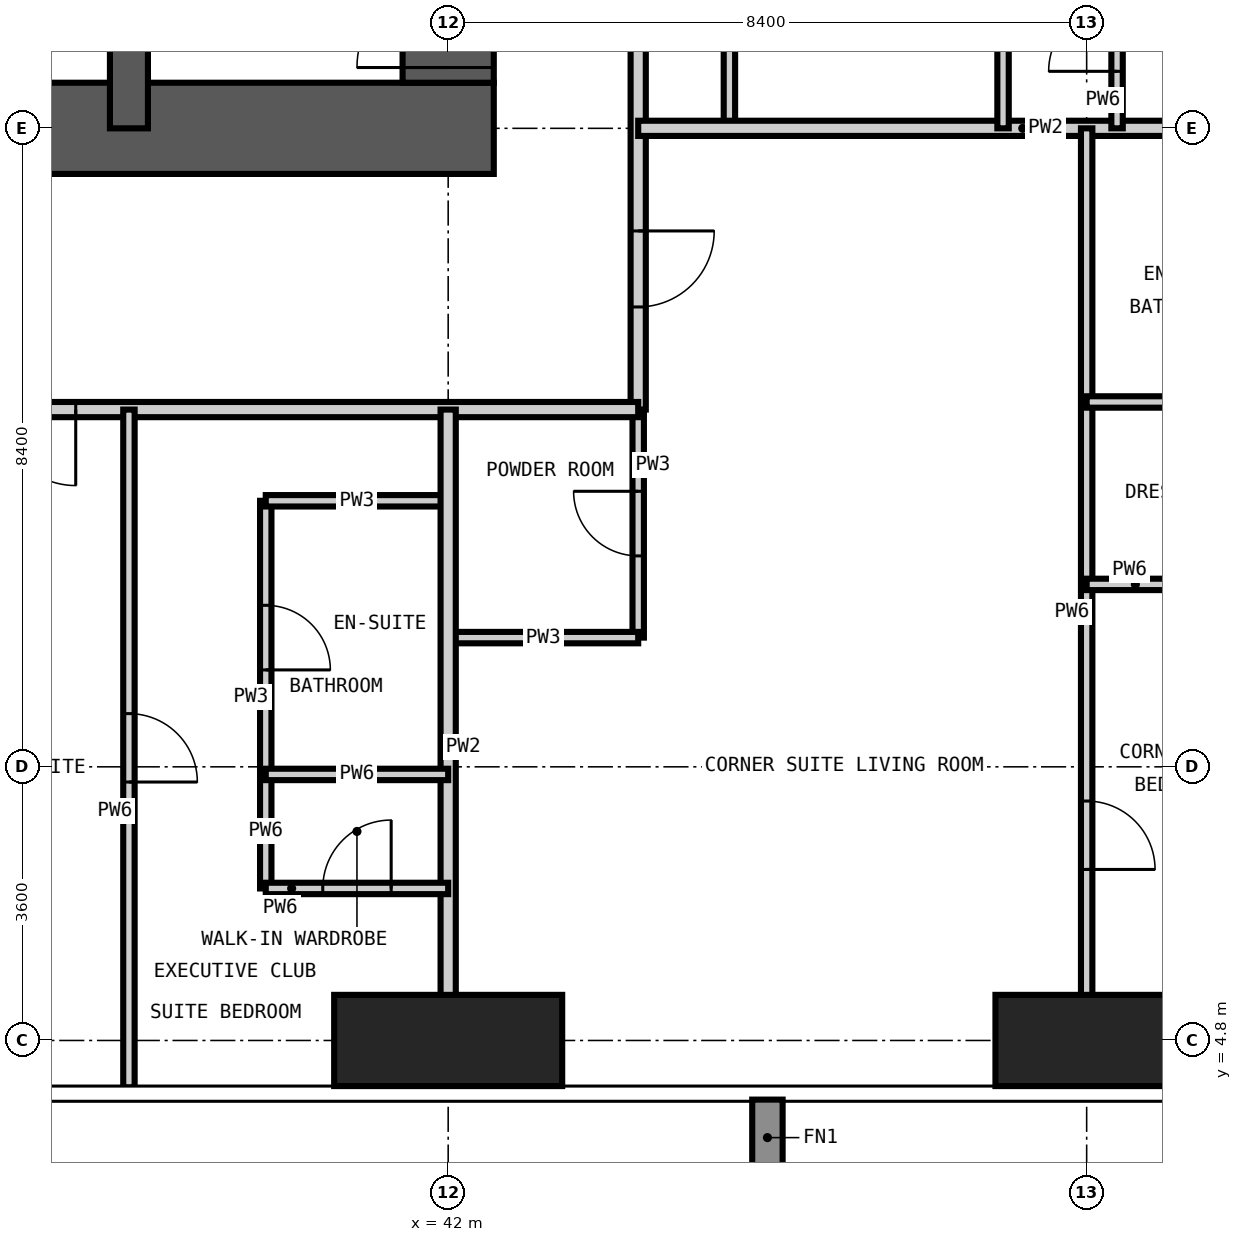
"""IFC4 building model, lengths in metres.
Left out: names, types, materials, properties, quantities, classifications, styles, units other than length and angle.
Written with IfcOpenShell. Run it as: python <this file> out.ifc"""

import sys

from ifc_helpers import new_model, si_unit, direction, frame, frame_2d, origin, origin_2d, place, context, subcontext, project, spatial, rectangle, extrude, element, fill, save


model = new_model("IFC4")
c1 = context("Model", 3, precision=1e-05, world=origin(), true_north=direction((0.0, 1.0)))
c2 = subcontext(c1, "Body", "Model", "MODEL_VIEW")
j1 = project(units=[si_unit("LENGTHUNIT", "METRE"), si_unit("PLANEANGLEUNIT", "RADIAN")], contexts=[c1])
p1 = place(None, origin())
s1 = spatial("IfcSite", under=j1, at=p1, CompositionType="ELEMENT")
p2 = place(p1, origin())
s2 = spatial("IfcBuilding", under=s1, at=p2, CompositionType="ELEMENT")
p3 = place(p2, frame((0.0, 0.0, 216.6)))
s3 = spatial("IfcBuildingStorey", under=s2, at=p3, CompositionType="ELEMENT", Elevation=216.6)
p4 = place(p3, frame((42.0, 4.8, -0.35), z_axis=(0.0, 0.0, 1.0), x_axis=(1.0, 0.0, 0.0)))
e1 = element("IfcColumn", 1, at=p4, inside=s3, PredefinedType="COLUMN", context=c2, shape_type="SweptSolid", body=[
    extrude(rectangle(XDim=3.0, YDim=1.2, at=origin_2d()), origin(), (0.0, 0.0, 1.0), 3.55),
])
p5 = place(p3, frame((50.4, 4.8, -0.35), z_axis=(0.0, 0.0, 1.0), x_axis=(1.0, 0.0, 0.0)))
e2 = element("IfcColumn", 2, at=p5, inside=s3, PredefinedType="COLUMN", context=c2, shape_type="SweptSolid", body=[
    extrude(rectangle(XDim=2.4, YDim=1.2, at=origin_2d()), origin(), (0.0, 0.0, 1.0), 3.55),
])
p6 = place(p3, frame((16.2, 16.8, -0.35), z_axis=(0.0, 0.0, 1.0), x_axis=(1.0, 0.0, 0.0)))
e3 = element("IfcWall", 3, at=p6, inside=s3, PredefinedType="SHEAR", context=c2, shape_type="SweptSolid", body=[
    extrude(rectangle(XDim=26.4, YDim=1.2, at=frame_2d((13.2, 0.0))), origin(), (0.0, 0.0, 1.0), 3.55),
])
p7 = place(p6, frame((12.7, 0.0, 0.35)))
e4 = element("IfcOpeningElement", 4, at=p7, cuts=e3, PredefinedType="OPENING", context=c2, shape_type="SweptSolid", body=[
    extrude(rectangle(XDim=1.0, YDim=2.1, at=frame_2d((0.5, 1.05))), frame((0.0, 0.61, 0.0), z_axis=(0.0, -1.0, 0.0), x_axis=(1.0, 0.0, 0.0)), (0.0, 0.0, 1.0), 1.22),
])
p8 = place(p6, frame((19.0, 0.0, 0.35)))
e5 = element("IfcOpeningElement", 5, at=p8, cuts=e3, PredefinedType="OPENING", context=c2, shape_type="SweptSolid", body=[
    extrude(rectangle(XDim=1.0, YDim=2.1, at=frame_2d((0.5, 1.05))), frame((0.0, 0.61, 0.0), z_axis=(0.0, -1.0, 0.0), x_axis=(1.0, 0.0, 0.0)), (0.0, 0.0, 1.0), 1.22),
])
p9 = place(p3, frame((42.0, 17.4, -0.35), z_axis=(0.0, 0.0, 1.0), x_axis=(0.0, 1.0, 0.0)))
e6 = element("IfcWall", 6, at=p9, inside=s3, PredefinedType="SHEAR", context=c2, shape_type="SweptSolid", body=[
    extrude(rectangle(XDim=24.0, YDim=1.2, at=frame_2d((12.0, 0.0))), origin(), (0.0, 0.0, 1.0), 3.55),
])
p10 = place(p9, frame((0.2, 0.0, 0.35)))
e7 = element("IfcOpeningElement", 7, at=p10, cuts=e6, PredefinedType="OPENING", context=c2, shape_type="SweptSolid", body=[
    extrude(rectangle(XDim=1.2, YDim=2.2, at=frame_2d((0.6, 1.1))), frame((0.0, 0.61, 0.0), z_axis=(0.0, -1.0, 0.0), x_axis=(1.0, 0.0, 0.0)), (0.0, 0.0, 1.0), 1.22),
])
p11 = place(p9, frame((11.5, 0.0, 0.35)))
e8 = element("IfcOpeningElement", 8, at=p11, cuts=e6, PredefinedType="OPENING", context=c2, shape_type="SweptSolid", body=[
    extrude(rectangle(XDim=1.0, YDim=2.1, at=frame_2d((0.5, 1.05))), frame((0.0, 0.61, 0.0), z_axis=(0.0, -1.0, 0.0), x_axis=(1.0, 0.0, 0.0)), (0.0, 0.0, 1.0), 1.22),
])
p12 = place(p9, frame((19.9, 0.0, 0.35)))
e9 = element("IfcOpeningElement", 9, at=p12, cuts=e6, PredefinedType="OPENING", context=c2, shape_type="SweptSolid", body=[
    extrude(rectangle(XDim=1.0, YDim=2.1, at=frame_2d((0.5, 1.05))), frame((0.0, 0.61, 0.0), z_axis=(0.0, -1.0, 0.0), x_axis=(1.0, 0.0, 0.0)), (0.0, 0.0, 1.0), 1.22),
])
p13 = place(p3, frame((37.8, 16.8, -0.35), z_axis=(0.0, 0.0, 1.0), x_axis=(0.0, 1.0, 0.0)))
e10 = element("IfcWall", 10, at=p13, inside=s3, PredefinedType="SHEAR", context=c2, shape_type="SweptSolid", body=[
    extrude(rectangle(XDim=11.2, YDim=0.5, at=frame_2d((5.6, 0.0))), origin(), (0.0, 0.0, 1.0), 3.55),
])
p14 = place(p3, frame((39.6, 8.3, 0.0), z_axis=(0.0, 0.0, 1.0), x_axis=(0.0, 1.0, 0.0)))
e11 = element("IfcWall", 11, at=p14, inside=s3, PredefinedType="PARTITIONING", context=c2, shape_type="SweptSolid", body=[
    extrude(rectangle(XDim=3.6, YDim=0.15, at=frame_2d((1.8, 0.0))), origin(), (0.0, 0.0, 1.0), 3.2),
])
p15 = place(p14, frame((1.375, 0.0, 0.0)))
e12 = element("IfcOpeningElement", 12, at=p15, cuts=e11, PredefinedType="OPENING", context=c2, shape_type="SweptSolid", body=[
    extrude(rectangle(XDim=0.85, YDim=2.1, at=frame_2d((0.425, 1.05))), frame((0.0, 0.085, 0.0), z_axis=(0.0, -1.0, 0.0), x_axis=(1.0, 0.0, 0.0)), (0.0, 0.0, 1.0), 0.17),
])
p16 = place(p3, frame((44.5, 10.1, 0.0), z_axis=(0.0, 0.0, 1.0), x_axis=(0.0, 1.0, 0.0)))
e13 = element("IfcWall", 13, at=p16, inside=s3, PredefinedType="PARTITIONING", context=c2, shape_type="SweptSolid", body=[
    extrude(rectangle(XDim=3.0, YDim=0.15, at=frame_2d((1.5, 0.0))), origin(), (0.0, 0.0, 1.0), 3.2),
])
p17 = place(p16, frame((1.075, 0.0, 0.0)))
e14 = element("IfcOpeningElement", 14, at=p17, cuts=e13, PredefinedType="OPENING", context=c2, shape_type="SweptSolid", body=[
    extrude(rectangle(XDim=0.85, YDim=2.1, at=frame_2d((0.425, 1.05))), frame((0.0, 0.085, 0.0), z_axis=(0.0, -1.0, 0.0), x_axis=(1.0, 0.0, 0.0)), (0.0, 0.0, 1.0), 0.17),
])
p18 = place(p3, frame((45.7, 16.8, 0.0), z_axis=(0.0, 0.0, 1.0), x_axis=(0.0, 1.0, 0.0)))
e15 = element("IfcWall", 15, at=p18, inside=s3, PredefinedType="PARTITIONING", context=c2, shape_type="SweptSolid", body=[
    extrude(rectangle(XDim=2.4, YDim=0.15, at=frame_2d((1.2, 0.0))), origin(), (0.0, 0.0, 1.0), 3.2),
])
p19 = place(p3, frame((42.0, 10.1, 0.0), z_axis=(0.0, 0.0, 1.0), x_axis=(1.0, 0.0, 0.0)))
e16 = element("IfcWall", 16, at=p19, inside=s3, PredefinedType="PARTITIONING", context=c2, shape_type="SweptSolid", body=[
    extrude(rectangle(XDim=2.5, YDim=0.15, at=frame_2d((1.25, 0.0))), origin(), (0.0, 0.0, 1.0), 3.2),
])
p20 = place(p3, frame((39.6, 11.9, 0.0), z_axis=(0.0, 0.0, 1.0), x_axis=(1.0, 0.0, 0.0)))
e17 = element("IfcWall", 17, at=p20, inside=s3, PredefinedType="PARTITIONING", context=c2, shape_type="SweptSolid", body=[
    extrude(rectangle(XDim=2.4, YDim=0.15, at=frame_2d((1.2, 0.0))), origin(), (0.0, 0.0, 1.0), 3.2),
])
p21 = place(p3, frame((44.5, 45.1, 0.0), z_axis=(0.0, 0.0, 1.0), x_axis=(0.0, -1.0, 0.0)))
e18 = element("IfcWall", 18, at=p21, inside=s3, PredefinedType="PARTITIONING", context=c2, shape_type="SweptSolid", body=[
    extrude(rectangle(XDim=32.0, YDim=0.2, at=frame_2d((16.0, 0.0))), origin(), (0.0, 0.0, 1.0), 3.2),
])
p22 = place(p21, frame((25.7, 0.0, 0.0)))
e19 = element("IfcOpeningElement", 19, at=p22, cuts=e18, PredefinedType="OPENING", context=c2, shape_type="SweptSolid", body=[
    extrude(rectangle(XDim=1.0, YDim=2.2, at=frame_2d((0.5, 1.1))), frame((0.0, 0.11, 0.0), z_axis=(0.0, -1.0, 0.0), x_axis=(1.0, 0.0, 0.0)), (0.0, 0.0, 1.0), 0.22),
])
p23 = place(p21, frame((19.4, 0.0, 0.0)))
e20 = element("IfcOpeningElement", 20, at=p23, cuts=e18, PredefinedType="OPENING", context=c2, shape_type="SweptSolid", body=[
    extrude(rectangle(XDim=1.0, YDim=2.2, at=frame_2d((0.5, 1.1))), frame((0.0, 0.11, 0.0), z_axis=(0.0, -1.0, 0.0), x_axis=(1.0, 0.0, 0.0)), (0.0, 0.0, 1.0), 0.22),
])
p24 = place(p21, frame((11.0, 0.0, 0.0)))
e21 = element("IfcOpeningElement", 21, at=p24, cuts=e18, PredefinedType="OPENING", context=c2, shape_type="SweptSolid", body=[
    extrude(rectangle(XDim=1.0, YDim=2.2, at=frame_2d((0.5, 1.1))), frame((0.0, 0.11, 0.0), z_axis=(0.0, -1.0, 0.0), x_axis=(1.0, 0.0, 0.0)), (0.0, 0.0, 1.0), 0.22),
])
p25 = place(p21, frame((4.7, 0.0, 0.0)))
e22 = element("IfcOpeningElement", 22, at=p25, cuts=e18, PredefinedType="OPENING", context=c2, shape_type="SweptSolid", body=[
    extrude(rectangle(XDim=1.0, YDim=2.2, at=frame_2d((0.5, 1.1))), frame((0.0, 0.11, 0.0), z_axis=(0.0, -1.0, 0.0), x_axis=(1.0, 0.0, 0.0)), (0.0, 0.0, 1.0), 0.22),
])
p26 = place(p21, frame((29.65, 0.0, 0.0)))
e23 = element("IfcOpeningElement", 23, at=p26, cuts=e18, PredefinedType="OPENING", context=c2, shape_type="SweptSolid", body=[
    extrude(rectangle(XDim=1.0, YDim=2.2, at=frame_2d((0.5, 1.1))), frame((0.0, 0.11, 0.0), z_axis=(0.0, -1.0, 0.0), x_axis=(1.0, 0.0, 0.0)), (0.0, 0.0, 1.0), 0.22),
])
p27 = place(p21, frame((1.05, 0.0, 0.0)))
e24 = element("IfcOpeningElement", 24, at=p27, cuts=e18, PredefinedType="OPENING", context=c2, shape_type="SweptSolid", body=[
    extrude(rectangle(XDim=1.0, YDim=2.2, at=frame_2d((0.5, 1.1))), frame((0.0, 0.11, 0.0), z_axis=(0.0, -1.0, 0.0), x_axis=(1.0, 0.0, 0.0)), (0.0, 0.0, 1.0), 0.22),
])
p28 = place(p3, frame((44.5, 13.1, 0.0), z_axis=(0.0, 0.0, 1.0), x_axis=(-1.0, 0.0, 0.0)))
e25 = element("IfcWall", 25, at=p28, inside=s3, PredefinedType="PARTITIONING", context=c2, shape_type="SweptSolid", body=[
    extrude(rectangle(XDim=31.4, YDim=0.2, at=frame_2d((15.7, 0.0))), origin(), (0.0, 0.0, 1.0), 3.2),
])
p29 = place(p28, frame((24.2, 0.0, 0.0)))
e26 = element("IfcOpeningElement", 26, at=p29, cuts=e25, PredefinedType="OPENING", context=c2, shape_type="SweptSolid", body=[
    extrude(rectangle(XDim=1.0, YDim=2.2, at=frame_2d((0.5, 1.1))), frame((0.0, 0.11, 0.0), z_axis=(0.0, -1.0, 0.0), x_axis=(1.0, 0.0, 0.0)), (0.0, 0.0, 1.0), 0.22),
])
p30 = place(p28, frame((13.4, 0.0, 0.0)))
e27 = element("IfcOpeningElement", 27, at=p30, cuts=e25, PredefinedType="OPENING", context=c2, shape_type="SweptSolid", body=[
    extrude(rectangle(XDim=1.0, YDim=2.2, at=frame_2d((0.5, 1.1))), frame((0.0, 0.11, 0.0), z_axis=(0.0, -1.0, 0.0), x_axis=(1.0, 0.0, 0.0)), (0.0, 0.0, 1.0), 0.22),
])
p31 = place(p28, frame((7.4, 0.0, 0.0)))
e28 = element("IfcOpeningElement", 28, at=p31, cuts=e25, PredefinedType="OPENING", context=c2, shape_type="SweptSolid", body=[
    extrude(rectangle(XDim=1.0, YDim=2.2, at=frame_2d((0.5, 1.1))), frame((0.0, 0.11, 0.0), z_axis=(0.0, -1.0, 0.0), x_axis=(1.0, 0.0, 0.0)), (0.0, 0.0, 1.0), 0.22),
])
p32 = place(p3, frame((42.0, 4.182, 0.0), z_axis=(0.0, 0.0, 1.0), x_axis=(0.0, 1.0, 0.0)))
e29 = element("IfcWall", 29, at=p32, inside=s3, PredefinedType="PARTITIONING", context=c2, shape_type="SweptSolid", body=[
    extrude(rectangle(XDim=8.918, YDim=0.2, at=frame_2d((4.459, 0.0))), origin(), (0.0, 0.0, 1.0), 3.2),
])
p33 = place(p3, frame((44.5, 16.8, 0.0), z_axis=(0.0, 0.0, 1.0), x_axis=(1.0, 0.0, 0.0)))
e30 = element("IfcWall", 30, at=p33, inside=s3, PredefinedType="PARTITIONING", context=c2, shape_type="SweptSolid", body=[
    extrude(rectangle(XDim=10.118, YDim=0.2, at=frame_2d((5.059, 0.0))), origin(), (0.0, 0.0, 1.0), 3.2),
])
p34 = place(p3, frame((37.8, 4.182, 0.0), z_axis=(0.0, 0.0, 1.0), x_axis=(0.0, 1.0, 0.0)))
e31 = element("IfcWall", 31, at=p34, inside=s3, PredefinedType="PARTITIONING", context=c2, shape_type="SweptSolid", body=[
    extrude(rectangle(XDim=8.918, YDim=0.15, at=frame_2d((4.459, 0.0))), origin(), (0.0, 0.0, 1.0), 3.2),
])
p35 = place(p34, frame((4.018, 0.0, 0.0)))
e32 = element("IfcOpeningElement", 32, at=p35, cuts=e31, PredefinedType="OPENING", context=c2, shape_type="SweptSolid", body=[
    extrude(rectangle(XDim=0.9, YDim=2.1, at=frame_2d((0.45, 1.05))), frame((0.0, 0.085, 0.0), z_axis=(0.0, -1.0, 0.0), x_axis=(1.0, 0.0, 0.0)), (0.0, 0.0, 1.0), 0.17),
])
p36 = place(p3, frame((39.6, 6.8, 0.0), z_axis=(0.0, 0.0, 1.0), x_axis=(0.0, 1.0, 0.0)))
e33 = element("IfcWall", 33, at=p36, inside=s3, PredefinedType="PARTITIONING", context=c2, shape_type="SweptSolid", body=[
    extrude(rectangle(XDim=1.5, YDim=0.15, at=frame_2d((0.75, 0.0))), origin(), (0.0, 0.0, 1.0), 3.2),
])
p37 = place(p3, frame((49.3, 16.8, 0.0), z_axis=(0.0, 0.0, 1.0), x_axis=(0.0, 1.0, 0.0)))
e34 = element("IfcWall", 34, at=p37, inside=s3, PredefinedType="PARTITIONING", context=c2, shape_type="SweptSolid", body=[
    extrude(rectangle(XDim=2.4, YDim=0.15, at=frame_2d((1.2, 0.0))), origin(), (0.0, 0.0, 1.0), 3.2),
])
p38 = place(p3, frame((50.4, 4.182, 0.0), z_axis=(0.0, 0.0, 1.0), x_axis=(0.0, 1.0, 0.0)))
e35 = element("IfcWall", 35, at=p38, inside=s3, PredefinedType="PARTITIONING", context=c2, shape_type="SweptSolid", body=[
    extrude(rectangle(XDim=12.618, YDim=0.15, at=frame_2d((6.309, 0.0))), origin(), (0.0, 0.0, 1.0), 3.2),
])
p39 = place(p38, frame((2.868, 0.0, 0.0)))
e36 = element("IfcOpeningElement", 36, at=p39, cuts=e35, PredefinedType="OPENING", context=c2, shape_type="SweptSolid", body=[
    extrude(rectangle(XDim=0.9, YDim=2.1, at=frame_2d((0.45, 1.05))), frame((0.0, 0.085, 0.0), z_axis=(0.0, -1.0, 0.0), x_axis=(1.0, 0.0, 0.0)), (0.0, 0.0, 1.0), 0.17),
])
p40 = place(p3, frame((50.8, 16.8, 0.0), z_axis=(0.0, 0.0, 1.0), x_axis=(0.0, 1.0, 0.0)))
e37 = element("IfcWall", 37, at=p40, inside=s3, PredefinedType="PARTITIONING", context=c2, shape_type="SweptSolid", body=[
    extrude(rectangle(XDim=2.4, YDim=0.15, at=frame_2d((1.2, 0.0))), origin(), (0.0, 0.0, 1.0), 3.2),
])
p41 = place(p40, frame((0.75, 0.0, 0.0)))
e38 = element("IfcOpeningElement", 38, at=p41, cuts=e37, PredefinedType="OPENING", context=c2, shape_type="SweptSolid", body=[
    extrude(rectangle(XDim=0.9, YDim=2.1, at=frame_2d((0.45, 1.05))), frame((0.0, 0.085, 0.0), z_axis=(0.0, -1.0, 0.0), x_axis=(1.0, 0.0, 0.0)), (0.0, 0.0, 1.0), 0.17),
])
p42 = place(p3, frame((39.6, 6.8, 0.0), z_axis=(0.0, 0.0, 1.0), x_axis=(1.0, 0.0, 0.0)))
e39 = element("IfcWall", 39, at=p42, inside=s3, PredefinedType="PARTITIONING", context=c2, shape_type="SweptSolid", body=[
    extrude(rectangle(XDim=2.4, YDim=0.15, at=frame_2d((1.2, 0.0))), origin(), (0.0, 0.0, 1.0), 3.2),
])
p43 = place(p42, frame((0.75, 0.0, 0.0)))
e40 = element("IfcOpeningElement", 40, at=p43, cuts=e39, PredefinedType="OPENING", context=c2, shape_type="SweptSolid", body=[
    extrude(rectangle(XDim=0.9, YDim=2.1, at=frame_2d((0.45, 1.05))), frame((0.0, 0.085, 0.0), z_axis=(0.0, -1.0, 0.0), x_axis=(1.0, 0.0, 0.0)), (0.0, 0.0, 1.0), 0.17),
])
p44 = place(p3, frame((39.6, 8.3, 0.0), z_axis=(0.0, 0.0, 1.0), x_axis=(1.0, 0.0, 0.0)))
e41 = element("IfcWall", 41, at=p44, inside=s3, PredefinedType="PARTITIONING", context=c2, shape_type="SweptSolid", body=[
    extrude(rectangle(XDim=2.4, YDim=0.15, at=frame_2d((1.2, 0.0))), origin(), (0.0, 0.0, 1.0), 3.2),
])
p45 = place(p3, frame((50.4, 10.8, 0.0), z_axis=(0.0, 0.0, 1.0), x_axis=(1.0, 0.0, 0.0)))
e42 = element("IfcWall", 42, at=p45, inside=s3, PredefinedType="PARTITIONING", context=c2, shape_type="SweptSolid", body=[
    extrude(rectangle(XDim=3.0, YDim=0.15, at=frame_2d((1.5, 0.0))), origin(), (0.0, 0.0, 1.0), 3.2),
])
p46 = place(p45, frame((1.05, 0.0, 0.0)))
e43 = element("IfcOpeningElement", 43, at=p46, cuts=e42, PredefinedType="OPENING", context=c2, shape_type="SweptSolid", body=[
    extrude(rectangle(XDim=0.9, YDim=2.1, at=frame_2d((0.45, 1.05))), frame((0.0, 0.085, 0.0), z_axis=(0.0, -1.0, 0.0), x_axis=(1.0, 0.0, 0.0)), (0.0, 0.0, 1.0), 0.17),
])
p47 = place(p3, frame((50.4, 13.2, 0.0), z_axis=(0.0, 0.0, 1.0), x_axis=(1.0, 0.0, 0.0)))
e44 = element("IfcWall", 44, at=p47, inside=s3, PredefinedType="PARTITIONING", context=c2, shape_type="SweptSolid", body=[
    extrude(rectangle(XDim=3.0, YDim=0.15, at=frame_2d((1.5, 0.0))), origin(), (0.0, 0.0, 1.0), 3.2),
])
p48 = place(p10, origin())
e45 = element("IfcDoor", 45, at=p48, inside=s3, OperationType="SINGLE_SWING_LEFT", PredefinedType="DOOR", context=c2, shape_type="SweptSolid", body=[
    extrude(rectangle(XDim=1.2, YDim=2.2, at=frame_2d((0.6, 1.1))), frame((0.0, 0.025, 0.0), z_axis=(0.0, -1.0, 0.0), x_axis=(1.0, 0.0, 0.0)), (0.0, 0.0, 1.0), 0.05),
])
fill(e7, e45)
p49 = place(p31, origin())
e46 = element("IfcDoor", 46, at=p49, inside=s3, OperationType="SINGLE_SWING_LEFT", PredefinedType="DOOR", context=c2, shape_type="SweptSolid", body=[
    extrude(rectangle(XDim=1.0, YDim=2.2, at=frame_2d((0.5, 1.1))), frame((0.0, 0.025, 0.0), z_axis=(0.0, -1.0, 0.0), x_axis=(1.0, 0.0, 0.0)), (0.0, 0.0, 1.0), 0.05),
])
fill(e28, e46)
p50 = place(p35, frame((0.9, 0.0, 0.0), z_axis=(0.0, 0.0, 1.0), x_axis=(-1.0, 0.0, 0.0)))
e47 = element("IfcDoor", 47, at=p50, inside=s3, OperationType="SINGLE_SWING_RIGHT", PredefinedType="DOOR", context=c2, shape_type="SweptSolid", body=[
    extrude(rectangle(XDim=0.9, YDim=2.1, at=frame_2d((0.45, 1.05))), frame((0.0, 0.025, 0.0), z_axis=(0.0, -1.0, 0.0), x_axis=(1.0, 0.0, 0.0)), (0.0, 0.0, 1.0), 0.05),
])
fill(e32, e47)
p51 = place(p15, frame((0.85, 0.0, 0.0), z_axis=(0.0, 0.0, 1.0), x_axis=(-1.0, 0.0, 0.0)))
e48 = element("IfcDoor", 48, at=p51, inside=s3, OperationType="SINGLE_SWING_RIGHT", PredefinedType="DOOR", context=c2, shape_type="SweptSolid", body=[
    extrude(rectangle(XDim=0.85, YDim=2.1, at=frame_2d((0.425, 1.05))), frame((0.0, 0.025, 0.0), z_axis=(0.0, -1.0, 0.0), x_axis=(1.0, 0.0, 0.0)), (0.0, 0.0, 1.0), 0.05),
])
fill(e12, e48)
p52 = place(p43, origin())
e49 = element("IfcDoor", 49, at=p52, inside=s3, OperationType="SINGLE_SWING_RIGHT", PredefinedType="DOOR", context=c2, shape_type="SweptSolid", body=[
    extrude(rectangle(XDim=0.9, YDim=2.1, at=frame_2d((0.45, 1.05))), frame((0.0, 0.025, 0.0), z_axis=(0.0, -1.0, 0.0), x_axis=(1.0, 0.0, 0.0)), (0.0, 0.0, 1.0), 0.05),
])
fill(e40, e49)
p53 = place(p41, origin())
e50 = element("IfcDoor", 50, at=p53, inside=s3, OperationType="SINGLE_SWING_LEFT", PredefinedType="DOOR", context=c2, shape_type="SweptSolid", body=[
    extrude(rectangle(XDim=0.9, YDim=2.1, at=frame_2d((0.45, 1.05))), frame((0.0, 0.025, 0.0), z_axis=(0.0, -1.0, 0.0), x_axis=(1.0, 0.0, 0.0)), (0.0, 0.0, 1.0), 0.05),
])
fill(e38, e50)
p54 = place(p26, origin())
e51 = element("IfcDoor", 51, at=p54, inside=s3, OperationType="SINGLE_SWING_LEFT", PredefinedType="DOOR", context=c2, shape_type="SweptSolid", body=[
    extrude(rectangle(XDim=1.0, YDim=2.2, at=frame_2d((0.5, 1.1))), frame((0.0, 0.025, 0.0), z_axis=(0.0, -1.0, 0.0), x_axis=(1.0, 0.0, 0.0)), (0.0, 0.0, 1.0), 0.05),
])
fill(e23, e51)
p55 = place(p17, origin())
e52 = element("IfcDoor", 52, at=p55, inside=s3, OperationType="SINGLE_SWING_RIGHT", PredefinedType="DOOR", context=c2, shape_type="SweptSolid", body=[
    extrude(rectangle(XDim=0.85, YDim=2.1, at=frame_2d((0.425, 1.05))), frame((0.0, 0.025, 0.0), z_axis=(0.0, -1.0, 0.0), x_axis=(1.0, 0.0, 0.0)), (0.0, 0.0, 1.0), 0.05),
])
fill(e14, e52)
p56 = place(p39, frame((0.9, 0.0, 0.0), z_axis=(0.0, 0.0, 1.0), x_axis=(-1.0, 0.0, 0.0)))
e53 = element("IfcDoor", 53, at=p56, inside=s3, OperationType="SINGLE_SWING_RIGHT", PredefinedType="DOOR", context=c2, shape_type="SweptSolid", body=[
    extrude(rectangle(XDim=0.9, YDim=2.1, at=frame_2d((0.45, 1.05))), frame((0.0, 0.025, 0.0), z_axis=(0.0, -1.0, 0.0), x_axis=(1.0, 0.0, 0.0)), (0.0, 0.0, 1.0), 0.05),
])
fill(e36, e53)
save(model, sys.argv[1])
